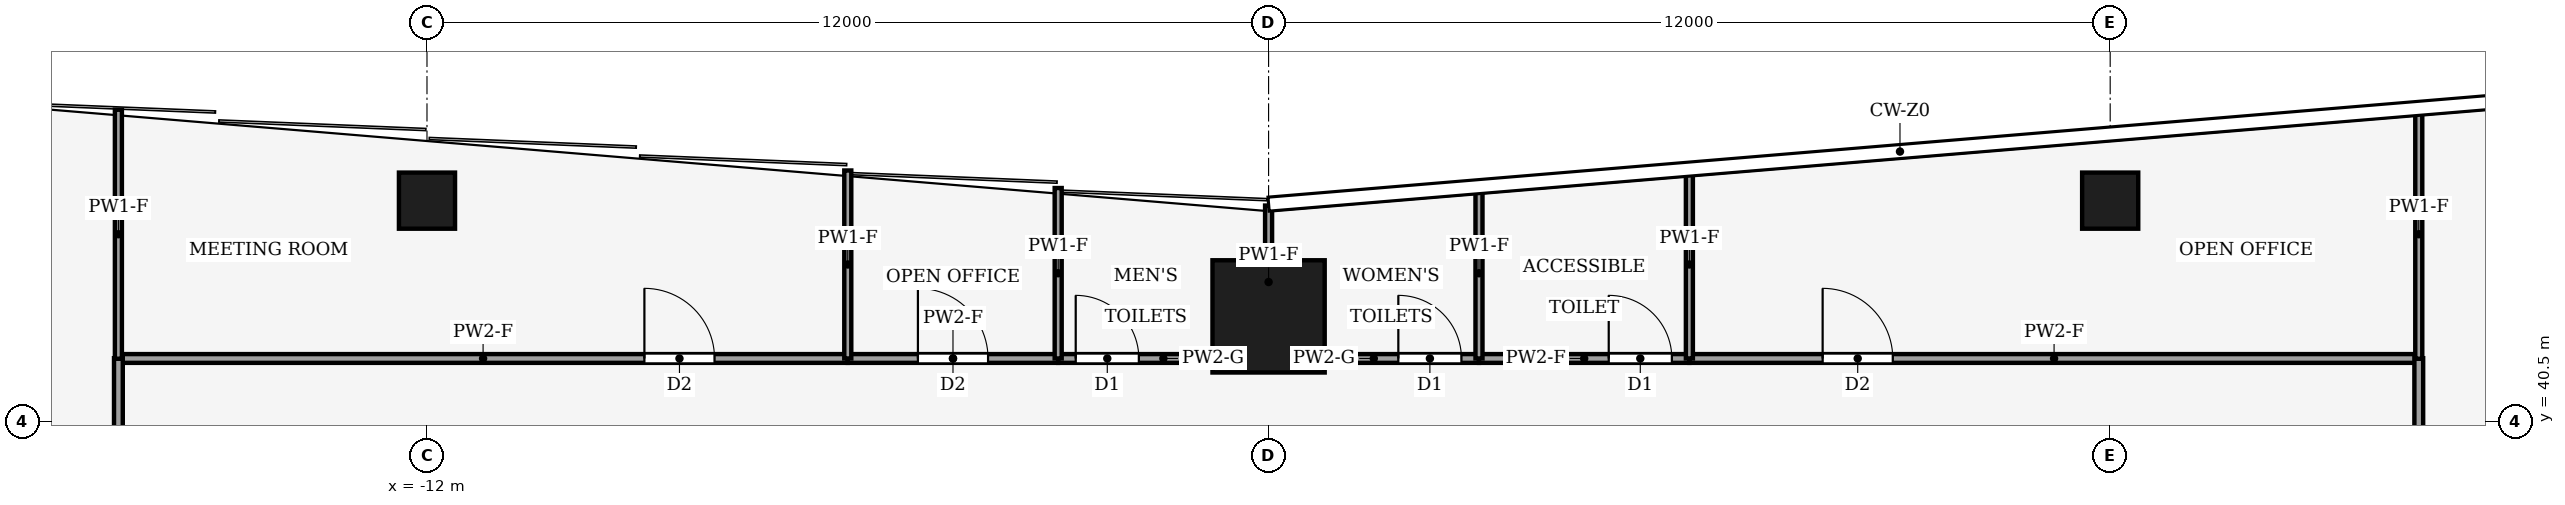
"""IFC4 building model, lengths in metres.
Left out: names, types, materials, properties, quantities, classifications, styles, units other than length and angle.
Written with IfcOpenShell. Run it as: python <this file> out.ifc"""

import sys

from ifc_helpers import new_model, si_unit, direction, frame, frame_2d, origin, origin_2d, place, context, subcontext, project, spatial, rectangle, hollow_rectangle, extrude, element, fill, save


model = new_model("IFC4")
c1 = context("Model", 3, precision=1e-05, world=origin(), true_north=direction((0.0, 1.0)))
c2 = subcontext(c1, "Body", "Model", "MODEL_VIEW")
j1 = project(units=[si_unit("LENGTHUNIT", "METRE"), si_unit("PLANEANGLEUNIT", "RADIAN")], contexts=[c1])
p1 = place(None, origin())
s1 = spatial("IfcSite", under=j1, at=p1, CompositionType="ELEMENT")
p2 = place(p1, origin())
s2 = spatial("IfcBuilding", under=s1, at=p2, CompositionType="ELEMENT")
p3 = place(p2, frame((0.0, 0.0, 46.0)))
s3 = spatial("IfcBuildingStorey", under=s2, at=p3, CompositionType="ELEMENT", Elevation=46.0)
p4 = place(p3, frame((0.0, 42.0, 0.0), z_axis=(0.0, 0.0, 1.0), x_axis=(1.0, 0.0, 0.0)))
e1 = element("IfcColumn", 1, at=p4, inside=s3, PredefinedType="COLUMN", context=c2, shape_type="SweptSolid", body=[
    extrude(hollow_rectangle(XDim=1.6, YDim=1.6, WallThickness=0.09, at=origin_2d()), origin(), (0.0, 0.0, 1.0), 4.0),
])
for number, where, z_axis, x_axis in (
    (2, (-12.0, 43.65, 0.0), (0.0, 0.0, 1.0), (1.0, 0.0, 0.0)),
    (3, (12.0, 43.65, 0.0), (0.0, 0.0, 1.0), (1.0, 0.0, 0.0)),
):
    element("IfcColumn", number, at=place(p3, frame(where, z_axis=z_axis, x_axis=x_axis)), inside=s3, PredefinedType="COLUMN", context=c2, shape_type="SweptSolid", body=[
        extrude(hollow_rectangle(XDim=0.8, YDim=0.8, WallThickness=0.04, at=origin_2d()), origin(), (0.0, 0.0, 1.0), 4.0),
    ])
p5 = place(p3, frame((-16.4, 41.4, 0.0), z_axis=(0.0, 0.0, 1.0), x_axis=(1.0, 0.0, 0.0)))
e4 = element("IfcWall", 4, at=p5, inside=s3, PredefinedType="PARTITIONING", context=c2, shape_type="SweptSolid", body=[
    extrude(rectangle(XDim=10.4, YDim=0.125, at=frame_2d((5.2, 0.0))), origin(), (0.0, 0.0, 1.0), 3.54),
])
p6 = place(p5, frame((7.5, 0.0, 0.0)))
e5 = element("IfcOpeningElement", 5, at=p6, cuts=e4, PredefinedType="OPENING", context=c2, shape_type="SweptSolid", body=[
    extrude(rectangle(XDim=1.0, YDim=2.1, at=frame_2d((0.5, 1.05))), frame((0.0, 0.073, 0.0), z_axis=(0.0, -1.0, 0.0), x_axis=(1.0, 0.0, 0.0)), (0.0, 0.0, 1.0), 0.145),
])
p7 = place(p3, frame((-6.0, 41.4, 0.0), z_axis=(0.0, 0.0, 1.0), x_axis=(1.0, 0.0, 0.0)))
e6 = element("IfcWall", 6, at=p7, inside=s3, PredefinedType="PARTITIONING", context=c2, shape_type="SweptSolid", body=[
    extrude(rectangle(XDim=3.0, YDim=0.125, at=frame_2d((1.5, 0.0))), origin(), (0.0, 0.0, 1.0), 3.54),
])
p8 = place(p7, frame((1.0, 0.0, 0.0)))
e7 = element("IfcOpeningElement", 7, at=p8, cuts=e6, PredefinedType="OPENING", context=c2, shape_type="SweptSolid", body=[
    extrude(rectangle(XDim=1.0, YDim=2.1, at=frame_2d((0.5, 1.05))), frame((0.0, 0.073, 0.0), z_axis=(0.0, -1.0, 0.0), x_axis=(1.0, 0.0, 0.0)), (0.0, 0.0, 1.0), 0.145),
])
p9 = place(p3, frame((-3.0, 41.4, 0.0), z_axis=(0.0, 0.0, 1.0), x_axis=(1.0, 0.0, 0.0)))
e8 = element("IfcWall", 8, at=p9, inside=s3, PredefinedType="PARTITIONING", context=c2, shape_type="SweptSolid", body=[
    extrude(rectangle(XDim=3.0, YDim=0.125, at=frame_2d((1.5, 0.0))), origin(), (0.0, 0.0, 1.0), 3.87),
])
p10 = place(p9, frame((0.25, 0.0, 0.0)))
e9 = element("IfcOpeningElement", 9, at=p10, cuts=e8, PredefinedType="OPENING", context=c2, shape_type="SweptSolid", body=[
    extrude(rectangle(XDim=0.9, YDim=2.1, at=frame_2d((0.45, 1.05))), frame((0.0, 0.073, 0.0), z_axis=(0.0, -1.0, 0.0), x_axis=(1.0, 0.0, 0.0)), (0.0, 0.0, 1.0), 0.145),
])
p11 = place(p3, frame((0.0, 41.4, 0.0), z_axis=(0.0, 0.0, 1.0), x_axis=(1.0, 0.0, 0.0)))
e10 = element("IfcWall", 10, at=p11, inside=s3, PredefinedType="PARTITIONING", context=c2, shape_type="SweptSolid", body=[
    extrude(rectangle(XDim=3.0, YDim=0.125, at=frame_2d((1.5, 0.0))), origin(), (0.0, 0.0, 1.0), 3.87),
])
p12 = place(p11, frame((1.85, 0.0, 0.0)))
e11 = element("IfcOpeningElement", 11, at=p12, cuts=e10, PredefinedType="OPENING", context=c2, shape_type="SweptSolid", body=[
    extrude(rectangle(XDim=0.9, YDim=2.1, at=frame_2d((0.45, 1.05))), frame((0.0, 0.073, 0.0), z_axis=(0.0, -1.0, 0.0), x_axis=(1.0, 0.0, 0.0)), (0.0, 0.0, 1.0), 0.145),
])
p13 = place(p3, frame((3.0, 41.4, 0.0), z_axis=(0.0, 0.0, 1.0), x_axis=(1.0, 0.0, 0.0)))
e12 = element("IfcWall", 12, at=p13, inside=s3, PredefinedType="PARTITIONING", context=c2, shape_type="SweptSolid", body=[
    extrude(rectangle(XDim=3.0, YDim=0.125, at=frame_2d((1.5, 0.0))), origin(), (0.0, 0.0, 1.0), 3.54),
])
p14 = place(p13, frame((1.85, 0.0, 0.0)))
e13 = element("IfcOpeningElement", 13, at=p14, cuts=e12, PredefinedType="OPENING", context=c2, shape_type="SweptSolid", body=[
    extrude(rectangle(XDim=0.9, YDim=2.1, at=frame_2d((0.45, 1.05))), frame((0.0, 0.073, 0.0), z_axis=(0.0, -1.0, 0.0), x_axis=(1.0, 0.0, 0.0)), (0.0, 0.0, 1.0), 0.145),
])
p15 = place(p3, frame((6.0, 41.4, 0.0), z_axis=(0.0, 0.0, 1.0), x_axis=(1.0, 0.0, 0.0)))
e14 = element("IfcWall", 14, at=p15, inside=s3, PredefinedType="PARTITIONING", context=c2, shape_type="SweptSolid", body=[
    extrude(rectangle(XDim=10.4, YDim=0.125, at=frame_2d((5.2, 0.0))), origin(), (0.0, 0.0, 1.0), 3.54),
])
p16 = place(p15, frame((1.9, 0.0, 0.0)))
e15 = element("IfcOpeningElement", 15, at=p16, cuts=e14, PredefinedType="OPENING", context=c2, shape_type="SweptSolid", body=[
    extrude(rectangle(XDim=1.0, YDim=2.1, at=frame_2d((0.5, 1.05))), frame((0.0, 0.073, 0.0), z_axis=(0.0, -1.0, 0.0), x_axis=(1.0, 0.0, 0.0)), (0.0, 0.0, 1.0), 0.145),
])
p17 = place(p3, frame((-16.4, 33.0, 0.0), z_axis=(0.0, 0.0, 1.0), x_axis=(0.0, 1.0, 0.0)))
e16 = element("IfcWall", 16, at=p17, inside=s3, PredefinedType="PARTITIONING", context=c2, shape_type="SweptSolid", body=[
    extrude(rectangle(XDim=8.404, YDim=0.125, at=frame_2d((4.202, 0.0))), origin(), (0.0, 0.0, 1.0), 3.14),
])
p18 = place(p17, frame((3.702, 0.0, 0.0)))
e17 = element("IfcOpeningElement", 17, at=p18, cuts=e16, PredefinedType="OPENING", context=c2, shape_type="SweptSolid", body=[
    extrude(rectangle(XDim=1.0, YDim=2.1, at=frame_2d((0.5, 1.05))), frame((0.0, 0.073, 0.0), z_axis=(0.0, -1.0, 0.0), x_axis=(1.0, 0.0, 0.0)), (0.0, 0.0, 1.0), 0.145),
])
p19 = place(p3, frame((16.4, 41.404, 0.0), z_axis=(0.0, 0.0, 1.0), x_axis=(0.0, -1.0, 0.0)))
e18 = element("IfcWall", 18, at=p19, inside=s3, PredefinedType="PARTITIONING", context=c2, shape_type="SweptSolid", body=[
    extrude(rectangle(XDim=8.404, YDim=0.125, at=frame_2d((4.202, 0.0))), origin(), (0.0, 0.0, 1.0), 3.14),
])
p20 = place(p19, frame((3.702, 0.0, 0.0)))
e19 = element("IfcOpeningElement", 19, at=p20, cuts=e18, PredefinedType="OPENING", context=c2, shape_type="SweptSolid", body=[
    extrude(rectangle(XDim=1.0, YDim=2.1, at=frame_2d((0.5, 1.05))), frame((0.0, 0.073, 0.0), z_axis=(0.0, -1.0, 0.0), x_axis=(1.0, 0.0, 0.0)), (0.0, 0.0, 1.0), 0.145),
])
p21 = place(p3, frame((-6.0, 41.4, 0.0), z_axis=(0.0, 0.0, 1.0), x_axis=(0.0, 1.0, 0.0)))
e20 = element("IfcWall", 20, at=p21, inside=s3, PredefinedType="PARTITIONING", context=c2, shape_type="SweptSolid", body=[
    extrude(rectangle(XDim=2.68, YDim=0.1, at=frame_2d((1.34, 0.0))), origin(), (0.0, 0.0, 1.0), 3.04),
])
p22 = place(p3, frame((-16.4, 44.947, 0.0), z_axis=(0.0, 0.0, 1.0), x_axis=(0.0, -1.0, 0.0)))
e21 = element("IfcWall", 21, at=p22, inside=s3, PredefinedType="PARTITIONING", context=c2, shape_type="SweptSolid", body=[
    extrude(rectangle(XDim=3.551, YDim=0.1, at=frame_2d((1.775, 0.0))), origin(), (0.0, 0.0, 1.0), 3.04),
])
p23 = place(p3, frame((-3.0, 41.4, 0.0), z_axis=(0.0, 0.0, 1.0), x_axis=(0.0, 1.0, 0.0)))
e22 = element("IfcWall", 22, at=p23, inside=s3, PredefinedType="PARTITIONING", context=c2, shape_type="SweptSolid", body=[
    extrude(rectangle(XDim=2.43, YDim=0.1, at=frame_2d((1.215, 0.0))), origin(), (0.0, 0.0, 1.0), 3.04),
])
p24 = place(p3, frame((0.0, 41.4, 0.0), z_axis=(0.0, 0.0, 1.0), x_axis=(0.0, 1.0, 0.0)))
e23 = element("IfcWall", 23, at=p24, inside=s3, PredefinedType="PARTITIONING", context=c2, shape_type="SweptSolid", body=[
    extrude(rectangle(XDim=2.18, YDim=0.1, at=frame_2d((1.09, 0.0))), origin(), (0.0, 0.0, 1.0), 3.04),
])
p25 = place(p3, frame((3.0, 41.4, 0.0), z_axis=(0.0, 0.0, 1.0), x_axis=(0.0, 1.0, 0.0)))
e24 = element("IfcWall", 24, at=p25, inside=s3, PredefinedType="PARTITIONING", context=c2, shape_type="SweptSolid", body=[
    extrude(rectangle(XDim=2.43, YDim=0.1, at=frame_2d((1.215, 0.0))), origin(), (0.0, 0.0, 1.0), 3.04),
])
p26 = place(p3, frame((6.0, 41.4, 0.0), z_axis=(0.0, 0.0, 1.0), x_axis=(0.0, 1.0, 0.0)))
e25 = element("IfcWall", 25, at=p26, inside=s3, PredefinedType="PARTITIONING", context=c2, shape_type="SweptSolid", body=[
    extrude(rectangle(XDim=2.68, YDim=0.1, at=frame_2d((1.34, 0.0))), origin(), (0.0, 0.0, 1.0), 3.04),
])
p27 = place(p3, frame((16.4, 41.396, 0.0), z_axis=(0.0, 0.0, 1.0), x_axis=(0.0, 1.0, 0.0)))
e26 = element("IfcWall", 26, at=p27, inside=s3, PredefinedType="PARTITIONING", context=c2, shape_type="SweptSolid", body=[
    extrude(rectangle(XDim=3.551, YDim=0.1, at=frame_2d((1.775, 0.0))), origin(), (0.0, 0.0, 1.0), 3.04),
])
p28 = place(p6, origin())
e27 = element("IfcDoor", 27, at=p28, inside=s3, OperationType="SINGLE_SWING_RIGHT", PredefinedType="DOOR", context=c2, shape_type="SweptSolid", body=[
    extrude(rectangle(XDim=1.0, YDim=2.1, at=frame_2d((0.5, 1.05))), frame((0.0, 0.025, 0.0), z_axis=(0.0, -1.0, 0.0), x_axis=(1.0, 0.0, 0.0)), (0.0, 0.0, 1.0), 0.05),
])
fill(e5, e27)
p29 = place(p8, origin())
e28 = element("IfcDoor", 28, at=p29, inside=s3, OperationType="SINGLE_SWING_RIGHT", PredefinedType="DOOR", context=c2, shape_type="SweptSolid", body=[
    extrude(rectangle(XDim=1.0, YDim=2.1, at=frame_2d((0.5, 1.05))), frame((0.0, 0.025, 0.0), z_axis=(0.0, -1.0, 0.0), x_axis=(1.0, 0.0, 0.0)), (0.0, 0.0, 1.0), 0.05),
])
fill(e7, e28)
p30 = place(p10, origin())
e29 = element("IfcDoor", 29, at=p30, inside=s3, OperationType="SINGLE_SWING_LEFT", PredefinedType="DOOR", context=c2, shape_type="SweptSolid", body=[
    extrude(rectangle(XDim=0.9, YDim=2.1, at=frame_2d((0.45, 1.05))), frame((0.0, 0.025, 0.0), z_axis=(0.0, -1.0, 0.0), x_axis=(1.0, 0.0, 0.0)), (0.0, 0.0, 1.0), 0.05),
])
fill(e9, e29)
p31 = place(p12, origin())
e30 = element("IfcDoor", 30, at=p31, inside=s3, OperationType="SINGLE_SWING_RIGHT", PredefinedType="DOOR", context=c2, shape_type="SweptSolid", body=[
    extrude(rectangle(XDim=0.9, YDim=2.1, at=frame_2d((0.45, 1.05))), frame((0.0, 0.025, 0.0), z_axis=(0.0, -1.0, 0.0), x_axis=(1.0, 0.0, 0.0)), (0.0, 0.0, 1.0), 0.05),
])
fill(e11, e30)
p32 = place(p14, origin())
e31 = element("IfcDoor", 31, at=p32, inside=s3, OperationType="SINGLE_SWING_RIGHT", PredefinedType="DOOR", context=c2, shape_type="SweptSolid", body=[
    extrude(rectangle(XDim=0.9, YDim=2.1, at=frame_2d((0.45, 1.05))), frame((0.0, 0.025, 0.0), z_axis=(0.0, -1.0, 0.0), x_axis=(1.0, 0.0, 0.0)), (0.0, 0.0, 1.0), 0.05),
])
fill(e13, e31)
p33 = place(p16, origin())
e32 = element("IfcDoor", 32, at=p33, inside=s3, OperationType="SINGLE_SWING_LEFT", PredefinedType="DOOR", context=c2, shape_type="SweptSolid", body=[
    extrude(rectangle(XDim=1.0, YDim=2.1, at=frame_2d((0.5, 1.05))), frame((0.0, 0.025, 0.0), z_axis=(0.0, -1.0, 0.0), x_axis=(1.0, 0.0, 0.0)), (0.0, 0.0, 1.0), 0.05),
])
fill(e15, e32)
save(model, sys.argv[1])
